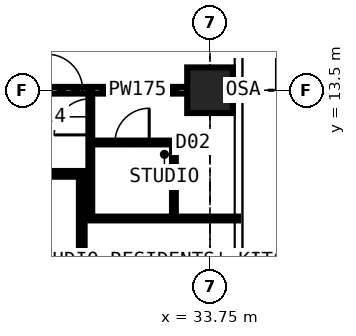
"""IFC4 building model, lengths in metres.
Left out: names, types, materials, properties, quantities, classifications, styles, units other than length and angle.
Written with IfcOpenShell. Run it as: python <this file> out.ifc"""

import sys

from ifc_helpers import new_model, si_unit, direction, frame, frame_2d, origin, origin_2d, place, context, subcontext, project, spatial, rectangle, extrude, element, fill, save


model = new_model("IFC4")
c1 = context("Model", 3, precision=1e-05, world=origin(), true_north=direction((0.0, 1.0)))
c2 = subcontext(c1, "Body", "Model", "MODEL_VIEW")
j1 = project(units=[si_unit("LENGTHUNIT", "METRE"), si_unit("PLANEANGLEUNIT", "RADIAN")], contexts=[c1])
p1 = place(None, origin())
s1 = spatial("IfcSite", under=j1, at=p1, CompositionType="ELEMENT")
p2 = place(p1, origin())
s2 = spatial("IfcBuilding", under=s1, at=p2, CompositionType="ELEMENT")
p3 = place(p2, frame((0.0, 0.0, 189.0)))
s3 = spatial("IfcBuildingStorey", under=s2, at=p3, CompositionType="ELEMENT", Elevation=189.0)
p4 = place(p3, frame((33.75, 13.5, 0.0), z_axis=(0.0, 0.0, 1.0), x_axis=(1.0, 0.0, 0.0)))
e1 = element("IfcColumn", 1, at=p4, inside=s3, PredefinedType="COLUMN", context=c2, shape_type="SweptSolid", body=[
    extrude(rectangle(XDim=1.2, YDim=1.2, at=origin_2d()), origin(), (0.0, 0.0, 1.0), 3.6),
])
p5 = place(p3, frame((10.125, 11.3, 0.0), z_axis=(0.0, 0.0, 1.0), x_axis=(1.0, 0.0, 0.0)))
e2 = element("IfcWall", 2, at=p5, inside=s3, PredefinedType="PARTITIONING", context=c2, shape_type="SweptSolid", body=[
    extrude(rectangle(XDim=20.475, YDim=0.15, at=frame_2d((10.238, 0.0))), origin(), (0.0, 0.0, 1.0), 3.375),
])
p6 = place(p5, frame((8.425, 0.0, 0.0)))
e3 = element("IfcOpeningElement", 3, at=p6, cuts=e2, PredefinedType="OPENING", context=c2, shape_type="SweptSolid", body=[
    extrude(rectangle(XDim=1.0, YDim=2.2, at=frame_2d((0.5, 1.1))), frame((0.0, 0.085, 0.0), z_axis=(0.0, -1.0, 0.0), x_axis=(1.0, 0.0, 0.0)), (0.0, 0.0, 1.0), 0.17),
])
p7 = place(p5, frame((10.975, 0.0, 0.0)))
e4 = element("IfcOpeningElement", 4, at=p7, cuts=e2, PredefinedType="OPENING", context=c2, shape_type="SweptSolid", body=[
    extrude(rectangle(XDim=1.0, YDim=2.2, at=frame_2d((0.5, 1.1))), frame((0.0, 0.085, 0.0), z_axis=(0.0, -1.0, 0.0), x_axis=(1.0, 0.0, 0.0)), (0.0, 0.0, 1.0), 0.17),
])
p8 = place(p5, frame((3.925, 0.0, 0.0)))
e5 = element("IfcOpeningElement", 5, at=p8, cuts=e2, PredefinedType="OPENING", context=c2, shape_type="SweptSolid", body=[
    extrude(rectangle(XDim=0.95, YDim=2.2, at=frame_2d((0.475, 1.1))), frame((0.0, 0.085, 0.0), z_axis=(0.0, -1.0, 0.0), x_axis=(1.0, 0.0, 0.0)), (0.0, 0.0, 1.0), 0.17),
])
p9 = place(p3, frame((29.2, 13.5, 0.0), z_axis=(0.0, 0.0, 1.0), x_axis=(1.0, 0.0, 0.0)))
e6 = element("IfcWall", 6, at=p9, inside=s3, PredefinedType="PARTITIONING", context=c2, shape_type="SweptSolid", body=[
    extrude(rectangle(XDim=5.284, YDim=0.175, at=frame_2d((2.642, 0.0))), origin(), (0.0, 0.0, 1.0), 2.61),
])
p10 = place(p9, frame((0.25, 0.0, 0.0)))
e7 = element("IfcOpeningElement", 7, at=p10, cuts=e6, PredefinedType="OPENING", context=c2, shape_type="SweptSolid", body=[
    extrude(rectangle(XDim=0.95, YDim=2.2, at=frame_2d((0.475, 1.1))), frame((0.0, 0.097, 0.0), z_axis=(0.0, -1.0, 0.0), x_axis=(1.0, 0.0, 0.0)), (0.0, 0.0, 1.0), 0.195),
])
p11 = place(p3, frame((30.375, 2.775, 0.0), z_axis=(0.0, 0.0, 1.0), x_axis=(0.0, 1.0, 0.0)))
e8 = element("IfcWall", 8, at=p11, inside=s3, PredefinedType="PARTITIONING", context=c2, shape_type="SweptSolid", body=[
    extrude(rectangle(XDim=8.525, YDim=0.15, at=frame_2d((4.263, 0.0))), origin(), (0.0, 0.0, 1.0), 2.877),
])
p12 = place(p11, frame((1.116, 0.0, 0.0)))
e9 = element("IfcOpeningElement", 9, at=p12, cuts=e8, PredefinedType="OPENING", context=c2, shape_type="SweptSolid", body=[
    extrude(rectangle(XDim=1.0, YDim=2.2, at=frame_2d((0.5, 1.1))), frame((0.0, 0.085, 0.0), z_axis=(0.0, -1.0, 0.0), x_axis=(1.0, 0.0, 0.0)), (0.0, 0.0, 1.0), 0.17),
])
p13 = place(p3, frame((30.6, 10.125, 0.0), z_axis=(0.0, 0.0, 1.0), x_axis=(0.0, 1.0, 0.0)))
e10 = element("IfcWall", 10, at=p13, inside=s3, PredefinedType="PARTITIONING", context=c2, shape_type="SweptSolid", body=[
    extrude(rectangle(XDim=3.375, YDim=0.1, at=frame_2d((1.688, 0.0))), origin(), (0.0, 0.0, 1.0), 3.375),
])
p14 = place(p13, frame((2.2, 0.0, 0.0)))
e11 = element("IfcOpeningElement", 11, at=p14, cuts=e10, PredefinedType="OPENING", context=c2, shape_type="SweptSolid", body=[
    extrude(rectangle(XDim=0.95, YDim=2.2, at=frame_2d((0.475, 1.1))), frame((0.0, 0.06, 0.0), z_axis=(0.0, -1.0, 0.0), x_axis=(1.0, 0.0, 0.0)), (0.0, 0.0, 1.0), 0.12),
])
p15 = place(p3, frame((30.6, 10.125, 0.0), z_axis=(0.0, 0.0, 1.0), x_axis=(1.0, 0.0, 0.0)))
e12 = element("IfcWall", 12, at=p15, inside=s3, PredefinedType="PARTITIONING", context=c2, shape_type="SweptSolid", body=[
    extrude(rectangle(XDim=3.884, YDim=0.1, at=frame_2d((1.942, 0.0))), origin(), (0.0, 0.0, 1.0), 3.375),
])
p16 = place(p3, frame((30.6, 12.125, 0.0), z_axis=(0.0, 0.0, 1.0), x_axis=(1.0, 0.0, 0.0)))
e13 = element("IfcWall", 13, at=p16, inside=s3, PredefinedType="PARTITIONING", context=c2, shape_type="SweptSolid", body=[
    extrude(rectangle(XDim=2.2, YDim=0.1, at=frame_2d((1.1, 0.0))), origin(), (0.0, 0.0, 1.0), 3.375),
])
p17 = place(p16, frame((0.65, 0.0, 0.0)))
e14 = element("IfcOpeningElement", 14, at=p17, cuts=e13, PredefinedType="OPENING", context=c2, shape_type="SweptSolid", body=[
    extrude(rectangle(XDim=0.9, YDim=2.2, at=frame_2d((0.45, 1.1))), frame((0.0, 0.06, 0.0), z_axis=(0.0, -1.0, 0.0), x_axis=(1.0, 0.0, 0.0)), (0.0, 0.0, 1.0), 0.12),
])
p18 = place(p3, frame((32.8, 10.125, 0.0), z_axis=(0.0, 0.0, 1.0), x_axis=(0.0, 1.0, 0.0)))
e15 = element("IfcWall", 15, at=p18, inside=s3, PredefinedType="PARTITIONING", context=c2, shape_type="SweptSolid", body=[
    extrude(rectangle(XDim=2.0, YDim=0.1, at=frame_2d((1.0, 0.0))), origin(), (0.0, 0.0, 1.0), 3.375),
])
p19 = place(p14, origin())
e16 = element("IfcDoor", 16, at=p19, inside=s3, OperationType="SINGLE_SWING_LEFT", PredefinedType="DOOR", context=c2, shape_type="SweptSolid", body=[
    extrude(rectangle(XDim=0.95, YDim=2.2, at=frame_2d((0.475, 1.1))), frame((0.0, 0.025, 0.0), z_axis=(0.0, -1.0, 0.0), x_axis=(1.0, 0.0, 0.0)), (0.0, 0.0, 1.0), 0.05),
])
fill(e11, e16)
p20 = place(p17, origin())
e17 = element("IfcDoor", 17, at=p20, inside=s3, OperationType="SINGLE_SWING_RIGHT", PredefinedType="DOOR", context=c2, shape_type="SweptSolid", body=[
    extrude(rectangle(XDim=0.9, YDim=2.2, at=frame_2d((0.45, 1.1))), frame((0.0, 0.025, 0.0), z_axis=(0.0, -1.0, 0.0), x_axis=(1.0, 0.0, 0.0)), (0.0, 0.0, 1.0), 0.05),
])
fill(e14, e17)
p21 = place(p10, origin())
e18 = element("IfcDoor", 18, at=p21, inside=s3, OperationType="SINGLE_SWING_LEFT", PredefinedType="DOOR", context=c2, shape_type="SweptSolid", body=[
    extrude(rectangle(XDim=0.95, YDim=2.2, at=frame_2d((0.475, 1.1))), frame((0.0, 0.025, 0.0), z_axis=(0.0, -1.0, 0.0), x_axis=(1.0, 0.0, 0.0)), (0.0, 0.0, 1.0), 0.05),
])
fill(e7, e18)
save(model, sys.argv[1])
